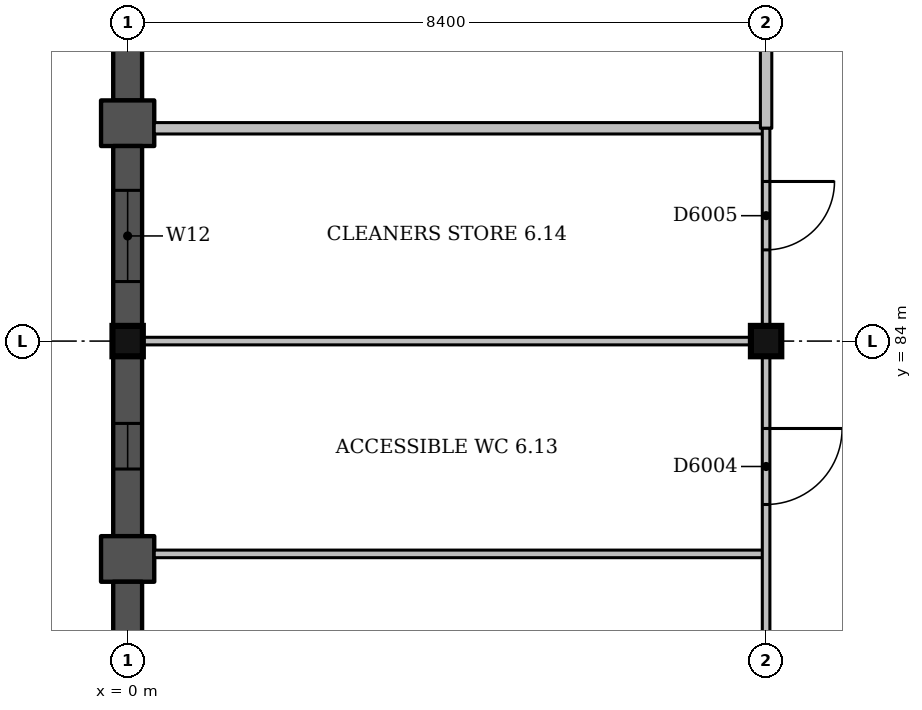
"""IFC4 building model, lengths in metres.
Left out: names, types, materials, properties, quantities, classifications, styles, units other than length and angle.
Written with IfcOpenShell. Run it as: python <this file> out.ifc"""

import sys

from ifc_helpers import new_model, si_unit, direction, frame, frame_2d, origin, origin_2d, place, context, subcontext, project, spatial, rectangle, extrude, element, fill, save


model = new_model("IFC4")
c1 = context("Model", 3, precision=1e-05, world=origin(), true_north=direction((0.0, 1.0)))
c2 = subcontext(c1, "Body", "Model", "MODEL_VIEW")
j1 = project(units=[si_unit("LENGTHUNIT", "METRE"), si_unit("PLANEANGLEUNIT", "RADIAN")], contexts=[c1])
p1 = place(None, origin())
s1 = spatial("IfcSite", under=j1, at=p1, CompositionType="ELEMENT")
p2 = place(p1, origin())
s2 = spatial("IfcBuilding", under=s1, at=p2, CompositionType="ELEMENT")
p3 = place(p2, frame((0.0, 0.0, 27.0)))
s3 = spatial("IfcBuildingStorey", under=s2, at=p3, CompositionType="ELEMENT", Elevation=27.0)
for number, where, z_axis, x_axis in (
    (1, (0.0, 84.0, 0.0), (0.0, 0.0, 1.0), (1.0, 0.0, 0.0)),
    (2, (8.4, 84.0, 0.0), (0.0, 0.0, 1.0), (1.0, 0.0, 0.0)),
):
    element("IfcColumn", number, at=place(p3, frame(where, z_axis=z_axis, x_axis=x_axis)), inside=s3, PredefinedType="COLUMN", context=c2, shape_type="SweptSolid", body=[
        extrude(rectangle(XDim=0.4, YDim=0.4, at=origin_2d()), origin(), (0.0, 0.0, 1.0), 4.5),
    ])
p4 = place(p3, frame((0.0, 89.233, 0.0), z_axis=(0.0, 0.0, 1.0), x_axis=(0.0, -1.0, 0.0)))
e3 = element("IfcWall", 3, at=p4, inside=s3, PredefinedType="SOLIDWALL", context=c2, shape_type="SweptSolid", body=[
    extrude(rectangle(XDim=2.067, YDim=0.38, at=frame_2d((1.033, 0.0))), origin(), (0.0, 0.0, 1.0), 3.35),
])
p5 = place(p3, frame((0.0, 87.167, 0.0), z_axis=(0.0, 0.0, 1.0), x_axis=(0.0, -1.0, 0.0)))
e4 = element("IfcWall", 4, at=p5, inside=s3, PredefinedType="SOLIDWALL", context=c2, shape_type="SweptSolid", body=[
    extrude(rectangle(XDim=0.6, YDim=0.7, at=frame_2d((0.3, 0.0))), origin(), (0.0, 0.0, 1.0), 3.35),
])
p6 = place(p3, frame((0.0, 86.567, 0.0), z_axis=(0.0, 0.0, 1.0), x_axis=(0.0, -1.0, 0.0)))
e5 = element("IfcWall", 5, at=p6, inside=s3, PredefinedType="SOLIDWALL", context=c2, shape_type="SweptSolid", body=[
    extrude(rectangle(XDim=2.367, YDim=0.38, at=frame_2d((1.183, 0.0))), origin(), (0.0, 0.0, 1.0), 3.35),
])
p7 = place(p6, frame((0.583, 0.0, 2.4)))
e6 = element("IfcOpeningElement", 6, at=p7, cuts=e5, PredefinedType="OPENING", context=c2, shape_type="SweptSolid", body=[
    extrude(rectangle(XDim=1.2, YDim=0.6, at=frame_2d((0.6, 0.3))), frame((0.0, 0.2, 0.0), z_axis=(0.0, -1.0, 0.0), x_axis=(1.0, 0.0, 0.0)), (0.0, 0.0, 1.0), 0.4),
])
p8 = place(p3, frame((0.0, 83.8, 0.0), z_axis=(0.0, 0.0, 1.0), x_axis=(0.0, -1.0, 0.0)))
e7 = element("IfcWall", 7, at=p8, inside=s3, PredefinedType="SOLIDWALL", context=c2, shape_type="SweptSolid", body=[
    extrude(rectangle(XDim=2.367, YDim=0.38, at=frame_2d((1.183, 0.0))), origin(), (0.0, 0.0, 1.0), 3.35),
])
p9 = place(p8, frame((0.883, 0.0, 1.5)))
e8 = element("IfcOpeningElement", 8, at=p9, cuts=e7, PredefinedType="OPENING", context=c2, shape_type="SweptSolid", body=[
    extrude(rectangle(XDim=0.6, YDim=1.2, at=frame_2d((0.3, 0.6))), frame((0.0, 0.2, 0.0), z_axis=(0.0, -1.0, 0.0), x_axis=(1.0, 0.0, 0.0)), (0.0, 0.0, 1.0), 0.4),
])
p10 = place(p3, frame((0.0, 81.433, 0.0), z_axis=(0.0, 0.0, 1.0), x_axis=(0.0, -1.0, 0.0)))
e9 = element("IfcWall", 9, at=p10, inside=s3, PredefinedType="SOLIDWALL", context=c2, shape_type="SweptSolid", body=[
    extrude(rectangle(XDim=0.6, YDim=0.7, at=frame_2d((0.3, 0.0))), origin(), (0.0, 0.0, 1.0), 3.35),
])
p11 = place(p3, frame((0.0, 80.833, 0.0), z_axis=(0.0, 0.0, 1.0), x_axis=(0.0, -1.0, 0.0)))
e10 = element("IfcWall", 10, at=p11, inside=s3, PredefinedType="SOLIDWALL", context=c2, shape_type="SweptSolid", body=[
    extrude(rectangle(XDim=2.067, YDim=0.38, at=frame_2d((1.033, 0.0))), origin(), (0.0, 0.0, 1.0), 3.35),
])
p12 = place(p11, frame((0.733, 0.0, 1.5)))
e11 = element("IfcOpeningElement", 11, at=p12, cuts=e10, PredefinedType="OPENING", context=c2, shape_type="SweptSolid", body=[
    extrude(rectangle(XDim=0.6, YDim=1.2, at=frame_2d((0.3, 0.6))), frame((0.0, 0.2, 0.0), z_axis=(0.0, -1.0, 0.0), x_axis=(1.0, 0.0, 0.0)), (0.0, 0.0, 1.0), 0.4),
])
p13 = place(p3, frame((0.35, 81.2, 0.0), z_axis=(0.0, 0.0, 1.0), x_axis=(1.0, 0.0, 0.0)))
e12 = element("IfcWall", 12, at=p13, inside=s3, PredefinedType="PARTITIONING", context=c2, shape_type="SweptSolid", body=[
    extrude(rectangle(XDim=8.05, YDim=0.1, at=frame_2d((4.025, 0.0))), origin(), (0.0, 0.0, 1.0), 3.4),
])
p14 = place(p3, frame((0.2, 84.0, 0.0), z_axis=(0.0, 0.0, 1.0), x_axis=(1.0, 0.0, 0.0)))
e13 = element("IfcWall", 13, at=p14, inside=s3, PredefinedType="PARTITIONING", context=c2, shape_type="SweptSolid", body=[
    extrude(rectangle(XDim=8.0, YDim=0.1, at=frame_2d((4.0, 0.0))), origin(), (0.0, 0.0, 1.0), 3.35),
])
p15 = place(p3, frame((0.35, 86.8, 0.0), z_axis=(0.0, 0.0, 1.0), x_axis=(1.0, 0.0, 0.0)))
e14 = element("IfcWall", 14, at=p15, inside=s3, PredefinedType="PARTITIONING", context=c2, shape_type="SweptSolid", body=[
    extrude(rectangle(XDim=8.05, YDim=0.15, at=frame_2d((4.025, 0.0))), origin(), (0.0, 0.0, 1.0), 3.4),
])
p16 = place(p3, frame((8.4, 86.8, 0.0), z_axis=(0.0, 0.0, 1.0), x_axis=(0.0, 1.0, 0.0)))
e15 = element("IfcWall", 15, at=p16, inside=s3, PredefinedType="PARTITIONING", context=c2, shape_type="SweptSolid", body=[
    extrude(rectangle(XDim=5.4, YDim=0.15, at=frame_2d((2.7, 0.0))), origin(), (0.0, 0.0, 1.0), 3.4),
])
p17 = place(p3, frame((8.4, 75.8, 0.0), z_axis=(0.0, 0.0, 1.0), x_axis=(0.0, 1.0, 0.0)))
e16 = element("IfcWall", 16, at=p17, inside=s3, PredefinedType="PARTITIONING", context=c2, shape_type="SweptSolid", body=[
    extrude(rectangle(XDim=8.0, YDim=0.1, at=frame_2d((4.0, 0.0))), origin(), (0.0, 0.0, 1.0), 3.4),
])
p18 = place(p17, frame((2.9, 0.0, 0.0)))
e17 = element("IfcOpeningElement", 17, at=p18, cuts=e16, PredefinedType="OPENING", context=c2, shape_type="SweptSolid", body=[
    extrude(rectangle(XDim=0.9, YDim=2.1, at=frame_2d((0.45, 1.05))), frame((0.0, 0.06, 0.0), z_axis=(0.0, -1.0, 0.0), x_axis=(1.0, 0.0, 0.0)), (0.0, 0.0, 1.0), 0.12),
])
p19 = place(p17, frame((6.05, 0.0, 0.0)))
e18 = element("IfcOpeningElement", 18, at=p19, cuts=e16, PredefinedType="OPENING", context=c2, shape_type="SweptSolid", body=[
    extrude(rectangle(XDim=1.0, YDim=2.1, at=frame_2d((0.5, 1.05))), frame((0.0, 0.06, 0.0), z_axis=(0.0, -1.0, 0.0), x_axis=(1.0, 0.0, 0.0)), (0.0, 0.0, 1.0), 0.12),
])
p20 = place(p3, frame((8.4, 84.2, 0.0), z_axis=(0.0, 0.0, 1.0), x_axis=(0.0, 1.0, 0.0)))
e19 = element("IfcWall", 19, at=p20, inside=s3, PredefinedType="PARTITIONING", context=c2, shape_type="SweptSolid", body=[
    extrude(rectangle(XDim=2.6, YDim=0.1, at=frame_2d((1.3, 0.0))), origin(), (0.0, 0.0, 1.0), 3.4),
])
p21 = place(p20, frame((1.0, 0.0, 0.0)))
e20 = element("IfcOpeningElement", 20, at=p21, cuts=e19, PredefinedType="OPENING", context=c2, shape_type="SweptSolid", body=[
    extrude(rectangle(XDim=0.9, YDim=2.1, at=frame_2d((0.45, 1.05))), frame((0.0, 0.06, 0.0), z_axis=(0.0, -1.0, 0.0), x_axis=(1.0, 0.0, 0.0)), (0.0, 0.0, 1.0), 0.12),
])
p22 = place(p7, origin())
e21 = element("IfcWindow", 21, at=p22, inside=s3, PartitioningType="SINGLE_PANEL", PredefinedType="WINDOW", context=c2, shape_type="SweptSolid", body=[
    extrude(rectangle(XDim=1.2, YDim=0.6, at=frame_2d((0.6, 0.3))), frame((0.0, 0.15, 0.0), z_axis=(0.0, -1.0, 0.0), x_axis=(1.0, 0.0, 0.0)), (0.0, 0.0, 1.0), 0.06),
])
fill(e6, e21)
p23 = place(p9, origin())
e22 = element("IfcWindow", 22, at=p23, inside=s3, PartitioningType="SINGLE_PANEL", PredefinedType="WINDOW", context=c2, shape_type="SweptSolid", body=[
    extrude(rectangle(XDim=0.6, YDim=1.2, at=frame_2d((0.3, 0.6))), frame((0.0, 0.15, 0.0), z_axis=(0.0, -1.0, 0.0), x_axis=(1.0, 0.0, 0.0)), (0.0, 0.0, 1.0), 0.06),
])
fill(e8, e22)
p24 = place(p19, origin())
e23 = element("IfcDoor", 23, at=p24, inside=s3, OperationType="SINGLE_SWING_RIGHT", PredefinedType="DOOR", context=c2, shape_type="SweptSolid", body=[
    extrude(rectangle(XDim=1.0, YDim=2.1, at=frame_2d((0.5, 1.05))), frame((0.0, 0.025, 0.0), z_axis=(0.0, -1.0, 0.0), x_axis=(1.0, 0.0, 0.0)), (0.0, 0.0, 1.0), 0.05),
])
fill(e18, e23)
p25 = place(p21, origin())
e24 = element("IfcDoor", 24, at=p25, inside=s3, OperationType="SINGLE_SWING_RIGHT", PredefinedType="DOOR", context=c2, shape_type="SweptSolid", body=[
    extrude(rectangle(XDim=0.9, YDim=2.1, at=frame_2d((0.45, 1.05))), frame((0.0, 0.025, 0.0), z_axis=(0.0, -1.0, 0.0), x_axis=(1.0, 0.0, 0.0)), (0.0, 0.0, 1.0), 0.05),
])
fill(e20, e24)
save(model, sys.argv[1])
